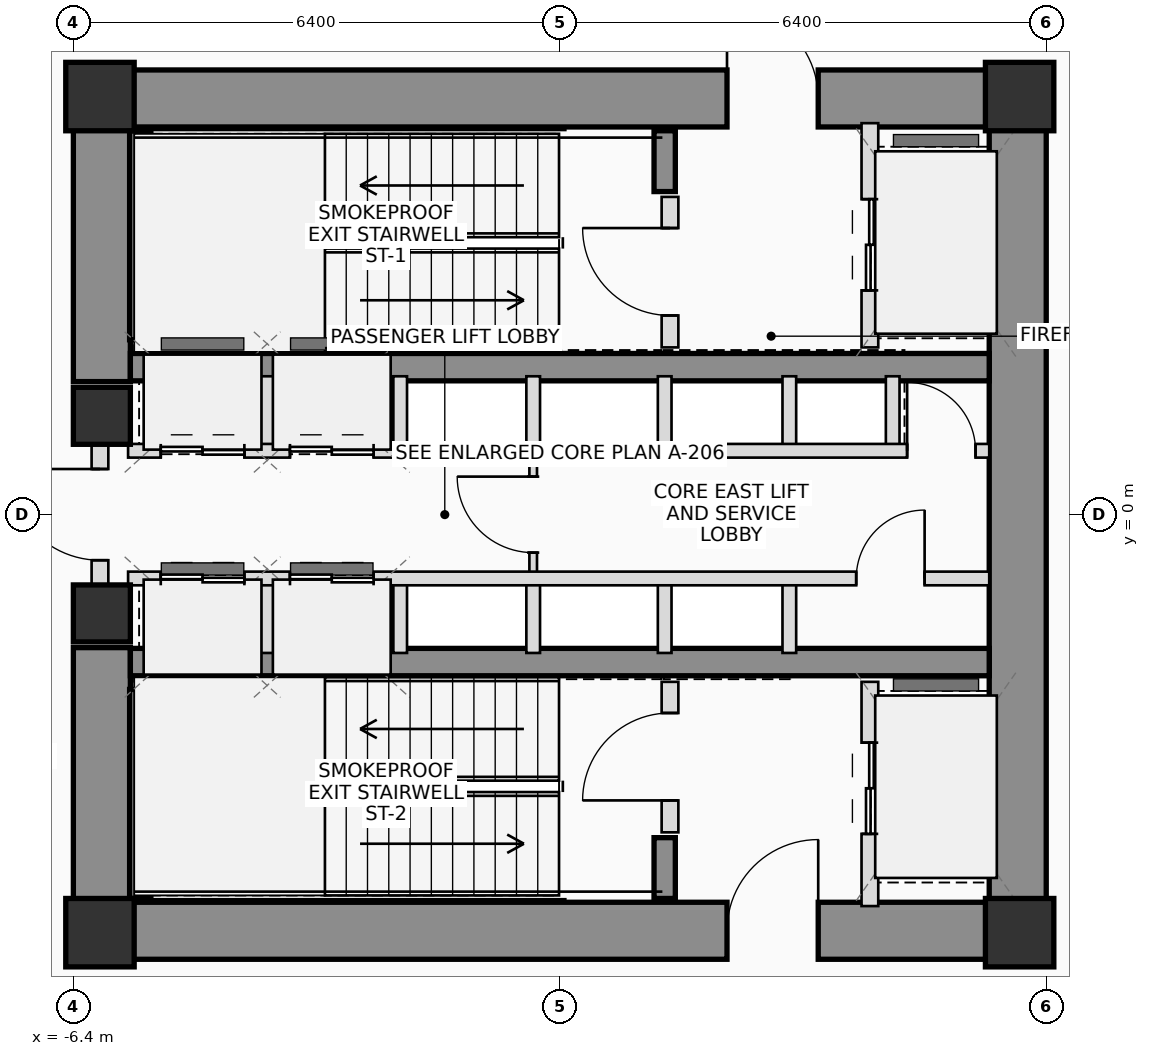
"""IFC4 building model, lengths in metres.
Left out: names, types, materials, properties, quantities, classifications, styles, units other than length and angle.
Written with IfcOpenShell. Run it as: python <this file> out.ifc"""

import sys

from ifc_helpers import new_model, si_unit, direction, frame, frame_2d, origin, origin_2d, place, context, subcontext, project, spatial, rectangle, extrude, source, transform, mapped, element, fill, save


model = new_model("IFC4")
c1 = context("Model", 3, precision=1e-05, world=origin(), true_north=direction((0.0, 1.0)))
c2 = subcontext(c1, "Body", "Model", "MODEL_VIEW")
j1 = project(units=[si_unit("LENGTHUNIT", "METRE"), si_unit("PLANEANGLEUNIT", "RADIAN")], contexts=[c1])
p1 = place(None, origin())
s1 = spatial("IfcSite", under=j1, at=p1, CompositionType="ELEMENT")
p2 = place(p1, origin())
s2 = spatial("IfcBuilding", under=s1, at=p2, CompositionType="ELEMENT")
p3 = place(p2, frame((0.0, 0.0, 58.55)))
s3 = spatial("IfcBuildingStorey", under=s2, at=p3, CompositionType="ELEMENT", Elevation=58.55)
m1 = source(origin(), c2, "Body", "SweptSolid", [
    extrude(rectangle(XDim=0.9, YDim=0.9, at=origin_2d()), origin(), (0.0, 0.0, 1.0), 3.75),
])
for number, where, z_axis, x_axis in (
    (1, (-6.05, -5.5, 0.0), (0.0, 0.0, 1.0), (1.0, 0.0, 0.0)),
    (2, (6.05, -5.5, 0.0), (0.0, 0.0, 1.0), (1.0, 0.0, 0.0)),
    (3, (6.05, 5.5, 0.0), (0.0, 0.0, 1.0), (1.0, 0.0, 0.0)),
    (4, (-6.05, 5.5, 0.0), (0.0, 0.0, 1.0), (1.0, 0.0, 0.0)),
):
    element("IfcColumn", number, at=place(p3, frame(where, z_axis=z_axis, x_axis=x_axis)), inside=s3, PredefinedType="COLUMN", context=c2, shape_type="MappedRepresentation", body=[
        mapped(m1, transform((0.0, 0.0, 0.0), scale=1.0)),
    ])
p4 = place(p3, frame((-6.4, 5.475, 0.0), z_axis=(0.0, 0.0, 1.0), x_axis=(1.0, 0.0, 0.0)))
e5 = element("IfcWall", 5, at=p4, inside=s3, PredefinedType="SHEAR", context=c2, shape_type="SweptSolid", body=[
    extrude(rectangle(XDim=12.8, YDim=0.75, at=frame_2d((6.4, 0.0))), origin(), (0.0, 0.0, 1.0), 3.75),
])
p5 = place(p4, frame((8.6, 0.0, 0.0)))
e6 = element("IfcOpeningElement", 6, at=p5, cuts=e5, PredefinedType="OPENING", context=c2, shape_type="SweptSolid", body=[
    extrude(rectangle(XDim=1.2, YDim=2.2, at=frame_2d((0.6, 1.1))), frame((0.0, 0.385, 0.0), z_axis=(0.0, -1.0, 0.0), x_axis=(1.0, 0.0, 0.0)), (0.0, 0.0, 1.0), 0.77),
])
p6 = place(p3, frame((-6.4, -5.475, 0.0), z_axis=(0.0, 0.0, 1.0), x_axis=(1.0, 0.0, 0.0)))
e7 = element("IfcWall", 7, at=p6, inside=s3, PredefinedType="SHEAR", context=c2, shape_type="SweptSolid", body=[
    extrude(rectangle(XDim=12.8, YDim=0.75, at=frame_2d((6.4, 0.0))), origin(), (0.0, 0.0, 1.0), 3.75),
])
p7 = place(p6, frame((8.6, 0.0, 0.0)))
e8 = element("IfcOpeningElement", 8, at=p7, cuts=e7, PredefinedType="OPENING", context=c2, shape_type="SweptSolid", body=[
    extrude(rectangle(XDim=1.2, YDim=2.2, at=frame_2d((0.6, 1.1))), frame((0.0, 0.385, 0.0), z_axis=(0.0, -1.0, 0.0), x_axis=(1.0, 0.0, 0.0)), (0.0, 0.0, 1.0), 0.77),
])
p8 = place(p3, frame((6.025, -5.1, 0.0), z_axis=(0.0, 0.0, 1.0), x_axis=(0.0, 1.0, 0.0)))
e9 = element("IfcWall", 9, at=p8, inside=s3, PredefinedType="SHEAR", context=c2, shape_type="SweptSolid", body=[
    extrude(rectangle(XDim=10.2, YDim=0.75, at=frame_2d((5.1, 0.0))), origin(), (0.0, 0.0, 1.0), 3.75),
])
for number, where, z_axis, x_axis in (
    (10, (-6.025, -5.1, 0.0), (0.0, 0.0, 1.0), (0.0, 1.0, 0.0)),
    (11, (-6.025, 1.75, 0.0), (0.0, 0.0, 1.0), (0.0, 1.0, 0.0)),
):
    element("IfcWall", number, at=place(p3, frame(where, z_axis=z_axis, x_axis=x_axis)), inside=s3, PredefinedType="SHEAR", context=c2, shape_type="SweptSolid", body=[
        extrude(rectangle(XDim=3.35, YDim=0.75, at=frame_2d((1.675, 0.0))), origin(), (0.0, 0.0, 1.0), 3.75),
    ])
for number, where, z_axis, x_axis in (
    (12, (-5.65, 1.94, 0.0), (0.0, 0.0, 1.0), (1.0, 0.0, 0.0)),
    (13, (-5.65, -1.94, 0.0), (0.0, 0.0, 1.0), (1.0, 0.0, 0.0)),
):
    element("IfcWall", number, at=place(p3, frame(where, z_axis=z_axis, x_axis=x_axis)), inside=s3, PredefinedType="SHEAR", context=c2, shape_type="SweptSolid", body=[
        extrude(rectangle(XDim=11.3, YDim=0.36, at=frame_2d((5.65, 0.0))), origin(), (0.0, 0.0, 1.0), 3.75),
    ])
p9 = place(p3, frame((-5.52, 2.3, 0.0), z_axis=(0.0, 0.0, 1.0), x_axis=(0.0, 1.0, 0.0)))
e14 = element("IfcWall", 14, at=p9, inside=s3, PredefinedType="SHEAR", context=c2, shape_type="SweptSolid", body=[
    extrude(rectangle(XDim=2.75, YDim=0.28, at=frame_2d((1.375, 0.0))), origin(), (0.0, 0.0, 1.0), 3.75),
])
p10 = place(p3, frame((1.38, 4.25, 0.0), z_axis=(0.0, 0.0, 1.0), x_axis=(0.0, 1.0, 0.0)))
e15 = element("IfcWall", 15, at=p10, inside=s3, PredefinedType="SHEAR", context=c2, shape_type="SweptSolid", body=[
    extrude(rectangle(XDim=0.8, YDim=0.28, at=frame_2d((0.4, 0.0))), origin(), (0.0, 0.0, 1.0), 3.75),
])
p11 = place(p3, frame((-5.52, -5.05, 0.0), z_axis=(0.0, 0.0, 1.0), x_axis=(0.0, 1.0, 0.0)))
e16 = element("IfcWall", 16, at=p11, inside=s3, PredefinedType="SHEAR", context=c2, shape_type="SweptSolid", body=[
    extrude(rectangle(XDim=2.75, YDim=0.28, at=frame_2d((1.375, 0.0))), origin(), (0.0, 0.0, 1.0), 3.75),
])
p12 = place(p3, frame((1.38, -5.05, 0.0), z_axis=(0.0, 0.0, 1.0), x_axis=(0.0, 1.0, 0.0)))
e17 = element("IfcWall", 17, at=p12, inside=s3, PredefinedType="SHEAR", context=c2, shape_type="SweptSolid", body=[
    extrude(rectangle(XDim=0.8, YDim=0.28, at=frame_2d((0.4, 0.0))), origin(), (0.0, 0.0, 1.0), 3.75),
])
m2 = source(origin(), c2, "Body", "SweptSolid", [
    extrude(rectangle(XDim=0.75, YDim=0.75, at=origin_2d()), origin(), (0.0, 0.0, 1.0), 3.75),
])
for number, where, z_axis, x_axis in (
    (18, (-6.025, -1.3, 0.0), (0.0, 0.0, 1.0), (1.0, 0.0, 0.0)),
    (19, (-6.025, 1.3, 0.0), (0.0, 0.0, 1.0), (1.0, 0.0, 0.0)),
):
    element("IfcColumn", number, at=place(p3, frame(where, z_axis=z_axis, x_axis=x_axis)), inside=s3, PredefinedType="COLUMN", context=c2, shape_type="MappedRepresentation", body=[
        mapped(m2, transform((0.0, 0.0, 0.0), scale=1.0)),
    ])
p13 = place(p3, frame((-6.05, -0.95, 0.0), z_axis=(0.0, 0.0, 1.0), x_axis=(0.0, 1.0, 0.0)))
e20 = element("IfcWall", 20, at=p13, inside=s3, PredefinedType="PLUMBINGWALL", context=c2, shape_type="SweptSolid", body=[
    extrude(rectangle(XDim=1.9, YDim=0.22, at=frame_2d((0.95, 0.0))), origin(), (0.0, 0.0, 1.0), 2.525),
])
p14 = place(p13, frame((0.35, 0.0, 0.0)))
e21 = element("IfcOpeningElement", 21, at=p14, cuts=e20, PredefinedType="OPENING", context=c2, shape_type="SweptSolid", body=[
    extrude(rectangle(XDim=1.2, YDim=2.2, at=frame_2d((0.6, 1.1))), frame((0.0, 0.12, 0.0), z_axis=(0.0, -1.0, 0.0), x_axis=(1.0, 0.0, 0.0)), (0.0, 0.0, 1.0), 0.24),
])
p15 = place(p3, frame((1.45, 2.2, 0.0), z_axis=(0.0, 0.0, 1.0), x_axis=(0.0, 1.0, 0.0)))
e22 = element("IfcWall", 22, at=p15, inside=s3, PredefinedType="PLUMBINGWALL", context=c2, shape_type="SweptSolid", body=[
    extrude(rectangle(XDim=1.98, YDim=0.22, at=frame_2d((0.99, 0.0))), origin(), (0.0, 0.0, 1.0), 3.545),
])
p16 = place(p15, frame((0.42, 0.0, 0.0)))
e23 = element("IfcOpeningElement", 23, at=p16, cuts=e22, PredefinedType="OPENING", context=c2, shape_type="SweptSolid", body=[
    extrude(rectangle(XDim=1.15, YDim=2.15, at=frame_2d((0.575, 1.075))), frame((0.0, 0.12, 0.0), z_axis=(0.0, -1.0, 0.0), x_axis=(1.0, 0.0, 0.0)), (0.0, 0.0, 1.0), 0.24),
])
p17 = place(p3, frame((4.08, 2.2, 0.0), z_axis=(0.0, 0.0, 1.0), x_axis=(0.0, 1.0, 0.0)))
e24 = element("IfcWall", 24, at=p17, inside=s3, PredefinedType="PLUMBINGWALL", context=c2, shape_type="SweptSolid", body=[
    extrude(rectangle(XDim=2.95, YDim=0.22, at=frame_2d((1.475, 0.0))), origin(), (0.0, 0.0, 1.0), 3.545),
])
p18 = place(p17, frame((0.75, 0.0, 0.0)))
e25 = element("IfcOpeningElement", 25, at=p18, cuts=e24, PredefinedType="OPENING", context=c2, shape_type="SweptSolid", body=[
    extrude(rectangle(XDim=1.2, YDim=2.25, at=frame_2d((0.6, 1.125))), frame((0.0, 0.12, 0.0), z_axis=(0.0, -1.0, 0.0), x_axis=(1.0, 0.0, 0.0)), (0.0, 0.0, 1.0), 0.24),
])
p19 = place(p3, frame((1.45, -4.18, 0.0), z_axis=(0.0, 0.0, 1.0), x_axis=(0.0, 1.0, 0.0)))
e26 = element("IfcWall", 26, at=p19, inside=s3, PredefinedType="PLUMBINGWALL", context=c2, shape_type="SweptSolid", body=[
    extrude(rectangle(XDim=1.98, YDim=0.22, at=frame_2d((0.99, 0.0))), origin(), (0.0, 0.0, 1.0), 3.545),
])
p20 = place(p19, frame((0.42, 0.0, 0.0)))
e27 = element("IfcOpeningElement", 27, at=p20, cuts=e26, PredefinedType="OPENING", context=c2, shape_type="SweptSolid", body=[
    extrude(rectangle(XDim=1.15, YDim=2.15, at=frame_2d((0.575, 1.075))), frame((0.0, 0.12, 0.0), z_axis=(0.0, -1.0, 0.0), x_axis=(1.0, 0.0, 0.0)), (0.0, 0.0, 1.0), 0.24),
])
p21 = place(p3, frame((4.08, -5.15, 0.0), z_axis=(0.0, 0.0, 1.0), x_axis=(0.0, 1.0, 0.0)))
e28 = element("IfcWall", 28, at=p21, inside=s3, PredefinedType="PLUMBINGWALL", context=c2, shape_type="SweptSolid", body=[
    extrude(rectangle(XDim=2.95, YDim=0.22, at=frame_2d((1.475, 0.0))), origin(), (0.0, 0.0, 1.0), 3.545),
])
p22 = place(p21, frame((0.95, 0.0, 0.0)))
e29 = element("IfcOpeningElement", 29, at=p22, cuts=e28, PredefinedType="OPENING", context=c2, shape_type="SweptSolid", body=[
    extrude(rectangle(XDim=1.2, YDim=2.25, at=frame_2d((0.6, 1.125))), frame((0.0, 0.12, 0.0), z_axis=(0.0, -1.0, 0.0), x_axis=(1.0, 0.0, 0.0)), (0.0, 0.0, 1.0), 0.24),
])
p23 = place(p3, frame((-0.35, -0.84, 0.0), z_axis=(0.0, 0.0, 1.0), x_axis=(0.0, 1.0, 0.0)))
e30 = element("IfcWall", 30, at=p23, inside=s3, PredefinedType="PARTITIONING", context=c2, shape_type="SweptSolid", body=[
    extrude(rectangle(XDim=1.68, YDim=0.1, at=frame_2d((0.84, 0.0))), origin(), (0.0, 0.0, 1.0), 3.545),
])
p24 = place(p23, frame((0.34, 0.0, 0.0)))
e31 = element("IfcOpeningElement", 31, at=p24, cuts=e30, PredefinedType="OPENING", context=c2, shape_type="SweptSolid", body=[
    extrude(rectangle(XDim=1.0, YDim=2.25, at=frame_2d((0.5, 1.125))), frame((0.0, 0.06, 0.0), z_axis=(0.0, -1.0, 0.0), x_axis=(1.0, 0.0, 0.0)), (0.0, 0.0, 1.0), 0.12),
])
for number, where, z_axis, x_axis in (
    (32, (-3.85, 0.84, 0.0), (0.0, 0.0, 1.0), (0.0, 1.0, 0.0)),
    (33, (-3.85, -1.82, 0.0), (0.0, 0.0, 1.0), (0.0, 1.0, 0.0)),
    (34, (-2.1, 0.84, 0.0), (0.0, 0.0, 1.0), (0.0, 1.0, 0.0)),
    (35, (-2.1, -1.82, 0.0), (0.0, 0.0, 1.0), (0.0, 1.0, 0.0)),
    (36, (-0.35, 0.84, 0.0), (0.0, 0.0, 1.0), (0.0, 1.0, 0.0)),
    (37, (-0.35, -1.82, 0.0), (0.0, 0.0, 1.0), (0.0, 1.0, 0.0)),
    (38, (1.38, 0.84, 0.0), (0.0, 0.0, 1.0), (0.0, 1.0, 0.0)),
    (39, (1.38, -1.82, 0.0), (0.0, 0.0, 1.0), (0.0, 1.0, 0.0)),
    (40, (3.02, 0.84, 0.0), (0.0, 0.0, 1.0), (0.0, 1.0, 0.0)),
    (41, (4.38, 0.84, 0.0), (0.0, 0.0, 1.0), (0.0, 1.0, 0.0)),
    (42, (3.02, -1.82, 0.0), (0.0, 0.0, 1.0), (0.0, 1.0, 0.0)),
):
    element("IfcWall", number, at=place(p3, frame(where, z_axis=z_axis, x_axis=x_axis)), inside=s3, PredefinedType="PLUMBINGWALL", context=c2, shape_type="SweptSolid", body=[
        extrude(rectangle(XDim=0.98, YDim=0.18, at=frame_2d((0.49, 0.0))), origin(), (0.0, 0.0, 1.0), 3.545),
    ])
p25 = place(p3, frame((-5.68, 0.84, 0.0), z_axis=(0.0, 0.0, 1.0), x_axis=(1.0, 0.0, 0.0)))
e43 = element("IfcWall", 43, at=p25, inside=s3, PredefinedType="PLUMBINGWALL", context=c2, shape_type="SweptSolid", body=[
    extrude(rectangle(XDim=11.33, YDim=0.18, at=frame_2d((5.665, 0.0))), origin(), (0.0, 0.0, 1.0), 3.545),
])
p26 = place(p25, frame((0.43, 0.0, 0.0)))
e44 = element("IfcOpeningElement", 44, at=p26, cuts=e43, PredefinedType="OPENING", context=c2, shape_type="SweptSolid", body=[
    extrude(rectangle(XDim=1.1, YDim=2.2, at=frame_2d((0.55, 1.1))), frame((0.0, 0.1, 0.0), z_axis=(0.0, -1.0, 0.0), x_axis=(1.0, 0.0, 0.0)), (0.0, 0.0, 1.0), 0.2),
])
p27 = place(p25, frame((2.13, 0.0, 0.0)))
e45 = element("IfcOpeningElement", 45, at=p27, cuts=e43, PredefinedType="OPENING", context=c2, shape_type="SweptSolid", body=[
    extrude(rectangle(XDim=1.1, YDim=2.2, at=frame_2d((0.55, 1.1))), frame((0.0, 0.1, 0.0), z_axis=(0.0, -1.0, 0.0), x_axis=(1.0, 0.0, 0.0)), (0.0, 0.0, 1.0), 0.2),
])
p28 = place(p25, frame((10.25, 0.0, 0.0)))
e46 = element("IfcOpeningElement", 46, at=p28, cuts=e43, PredefinedType="OPENING", context=c2, shape_type="SweptSolid", body=[
    extrude(rectangle(XDim=0.9, YDim=2.05, at=frame_2d((0.45, 1.025))), frame((0.0, 0.1, 0.0), z_axis=(0.0, -1.0, 0.0), x_axis=(1.0, 0.0, 0.0)), (0.0, 0.0, 1.0), 0.2),
])
p29 = place(p3, frame((-5.68, -0.84, 0.0), z_axis=(0.0, 0.0, 1.0), x_axis=(1.0, 0.0, 0.0)))
e47 = element("IfcWall", 47, at=p29, inside=s3, PredefinedType="PLUMBINGWALL", context=c2, shape_type="SweptSolid", body=[
    extrude(rectangle(XDim=11.33, YDim=0.18, at=frame_2d((5.665, 0.0))), origin(), (0.0, 0.0, 1.0), 3.545),
])
p30 = place(p29, frame((0.43, 0.0, 0.0)))
e48 = element("IfcOpeningElement", 48, at=p30, cuts=e47, PredefinedType="OPENING", context=c2, shape_type="SweptSolid", body=[
    extrude(rectangle(XDim=1.1, YDim=2.2, at=frame_2d((0.55, 1.1))), frame((0.0, 0.1, 0.0), z_axis=(0.0, -1.0, 0.0), x_axis=(1.0, 0.0, 0.0)), (0.0, 0.0, 1.0), 0.2),
])
p31 = place(p29, frame((2.13, 0.0, 0.0)))
e49 = element("IfcOpeningElement", 49, at=p31, cuts=e47, PredefinedType="OPENING", context=c2, shape_type="SweptSolid", body=[
    extrude(rectangle(XDim=1.1, YDim=2.2, at=frame_2d((0.55, 1.1))), frame((0.0, 0.1, 0.0), z_axis=(0.0, -1.0, 0.0), x_axis=(1.0, 0.0, 0.0)), (0.0, 0.0, 1.0), 0.2),
])
p32 = place(p29, frame((9.58, 0.0, 0.0)))
e50 = element("IfcOpeningElement", 50, at=p32, cuts=e47, PredefinedType="OPENING", context=c2, shape_type="SweptSolid", body=[
    extrude(rectangle(XDim=0.9, YDim=2.05, at=frame_2d((0.45, 1.025))), frame((0.0, 0.1, 0.0), z_axis=(0.0, -1.0, 0.0), x_axis=(1.0, 0.0, 0.0)), (0.0, 0.0, 1.0), 0.2),
])
p33 = place(p5, origin())
e51 = element("IfcDoor", 51, at=p33, inside=s3, OperationType="SINGLE_SWING_LEFT", PredefinedType="DOOR", context=c2, shape_type="SweptSolid", body=[
    extrude(rectangle(XDim=1.2, YDim=2.2, at=frame_2d((0.6, 1.1))), frame((0.0, 0.025, 0.0), z_axis=(0.0, -1.0, 0.0), x_axis=(1.0, 0.0, 0.0)), (0.0, 0.0, 1.0), 0.05),
])
fill(e6, e51)
p34 = place(p7, origin())
e52 = element("IfcDoor", 52, at=p34, inside=s3, OperationType="SINGLE_SWING_RIGHT", PredefinedType="DOOR", context=c2, shape_type="SweptSolid", body=[
    extrude(rectangle(XDim=1.2, YDim=2.2, at=frame_2d((0.6, 1.1))), frame((0.0, 0.025, 0.0), z_axis=(0.0, -1.0, 0.0), x_axis=(1.0, 0.0, 0.0)), (0.0, 0.0, 1.0), 0.05),
])
fill(e8, e52)
p35 = place(p14, origin())
e53 = element("IfcDoor", 53, at=p35, inside=s3, OperationType="SINGLE_SWING_RIGHT", PredefinedType="DOOR", context=c2, shape_type="SweptSolid", body=[
    extrude(rectangle(XDim=1.2, YDim=2.2, at=frame_2d((0.6, 1.1))), frame((0.0, 0.025, 0.0), z_axis=(0.0, -1.0, 0.0), x_axis=(1.0, 0.0, 0.0)), (0.0, 0.0, 1.0), 0.05),
])
fill(e21, e53)
p36 = place(p16, origin())
e54 = element("IfcDoor", 54, at=p36, inside=s3, OperationType="SINGLE_SWING_RIGHT", PredefinedType="DOOR", context=c2, shape_type="SweptSolid", body=[
    extrude(rectangle(XDim=1.15, YDim=2.15, at=frame_2d((0.575, 1.075))), frame((0.0, 0.025, 0.0), z_axis=(0.0, -1.0, 0.0), x_axis=(1.0, 0.0, 0.0)), (0.0, 0.0, 1.0), 0.05),
])
fill(e23, e54)
p37 = place(p18, origin())
e55 = element("IfcDoor", 55, at=p37, inside=s3, OperationType="DOUBLE_DOOR_SLIDING", PredefinedType="DOOR", context=c2, shape_type="SweptSolid", body=[
    extrude(rectangle(XDim=1.2, YDim=2.25, at=frame_2d((0.6, 1.125))), frame((0.0, 0.025, 0.0), z_axis=(0.0, -1.0, 0.0), x_axis=(1.0, 0.0, 0.0)), (0.0, 0.0, 1.0), 0.05),
])
fill(e25, e55)
p38 = place(p20, origin())
e56 = element("IfcDoor", 56, at=p38, inside=s3, OperationType="SINGLE_SWING_LEFT", PredefinedType="DOOR", context=c2, shape_type="SweptSolid", body=[
    extrude(rectangle(XDim=1.15, YDim=2.15, at=frame_2d((0.575, 1.075))), frame((0.0, 0.025, 0.0), z_axis=(0.0, -1.0, 0.0), x_axis=(1.0, 0.0, 0.0)), (0.0, 0.0, 1.0), 0.05),
])
fill(e27, e56)
p39 = place(p22, origin())
e57 = element("IfcDoor", 57, at=p39, inside=s3, OperationType="DOUBLE_DOOR_SLIDING", PredefinedType="DOOR", context=c2, shape_type="SweptSolid", body=[
    extrude(rectangle(XDim=1.2, YDim=2.25, at=frame_2d((0.6, 1.125))), frame((0.0, 0.025, 0.0), z_axis=(0.0, -1.0, 0.0), x_axis=(1.0, 0.0, 0.0)), (0.0, 0.0, 1.0), 0.05),
])
fill(e29, e57)
p40 = place(p24, origin())
e58 = element("IfcDoor", 58, at=p40, inside=s3, OperationType="SINGLE_SWING_RIGHT", PredefinedType="DOOR", context=c2, shape_type="SweptSolid", body=[
    extrude(rectangle(XDim=1.0, YDim=2.25, at=frame_2d((0.5, 1.125))), frame((0.0, 0.025, 0.0), z_axis=(0.0, -1.0, 0.0), x_axis=(1.0, 0.0, 0.0)), (0.0, 0.0, 1.0), 0.05),
])
fill(e31, e58)
p41 = place(p26, origin())
e59 = element("IfcDoor", 59, at=p41, inside=s3, OperationType="DOUBLE_DOOR_SLIDING", PredefinedType="DOOR", context=c2, shape_type="SweptSolid", body=[
    extrude(rectangle(XDim=1.1, YDim=2.2, at=frame_2d((0.55, 1.1))), frame((0.0, 0.025, 0.0), z_axis=(0.0, -1.0, 0.0), x_axis=(1.0, 0.0, 0.0)), (0.0, 0.0, 1.0), 0.05),
])
fill(e44, e59)
p42 = place(p27, origin())
e60 = element("IfcDoor", 60, at=p42, inside=s3, OperationType="DOUBLE_DOOR_SLIDING", PredefinedType="DOOR", context=c2, shape_type="SweptSolid", body=[
    extrude(rectangle(XDim=1.1, YDim=2.2, at=frame_2d((0.55, 1.1))), frame((0.0, 0.025, 0.0), z_axis=(0.0, -1.0, 0.0), x_axis=(1.0, 0.0, 0.0)), (0.0, 0.0, 1.0), 0.05),
])
fill(e45, e60)
p43 = place(p28, origin())
e61 = element("IfcDoor", 61, at=p43, inside=s3, OperationType="SINGLE_SWING_LEFT", PredefinedType="DOOR", context=c2, shape_type="SweptSolid", body=[
    extrude(rectangle(XDim=0.9, YDim=2.05, at=frame_2d((0.45, 1.025))), frame((0.0, 0.025, 0.0), z_axis=(0.0, -1.0, 0.0), x_axis=(1.0, 0.0, 0.0)), (0.0, 0.0, 1.0), 0.05),
])
fill(e46, e61)
p44 = place(p30, origin())
e62 = element("IfcDoor", 62, at=p44, inside=s3, OperationType="DOUBLE_DOOR_SLIDING", PredefinedType="DOOR", context=c2, shape_type="SweptSolid", body=[
    extrude(rectangle(XDim=1.1, YDim=2.2, at=frame_2d((0.55, 1.1))), frame((0.0, 0.025, 0.0), z_axis=(0.0, -1.0, 0.0), x_axis=(1.0, 0.0, 0.0)), (0.0, 0.0, 1.0), 0.05),
])
fill(e48, e62)
p45 = place(p31, origin())
e63 = element("IfcDoor", 63, at=p45, inside=s3, OperationType="DOUBLE_DOOR_SLIDING", PredefinedType="DOOR", context=c2, shape_type="SweptSolid", body=[
    extrude(rectangle(XDim=1.1, YDim=2.2, at=frame_2d((0.55, 1.1))), frame((0.0, 0.025, 0.0), z_axis=(0.0, -1.0, 0.0), x_axis=(1.0, 0.0, 0.0)), (0.0, 0.0, 1.0), 0.05),
])
fill(e49, e63)
p46 = place(p32, origin())
e64 = element("IfcDoor", 64, at=p46, inside=s3, OperationType="SINGLE_SWING_RIGHT", PredefinedType="DOOR", context=c2, shape_type="SweptSolid", body=[
    extrude(rectangle(XDim=0.9, YDim=2.05, at=frame_2d((0.45, 1.025))), frame((0.0, 0.025, 0.0), z_axis=(0.0, -1.0, 0.0), x_axis=(1.0, 0.0, 0.0)), (0.0, 0.0, 1.0), 0.05),
])
fill(e50, e64)
save(model, sys.argv[1])
